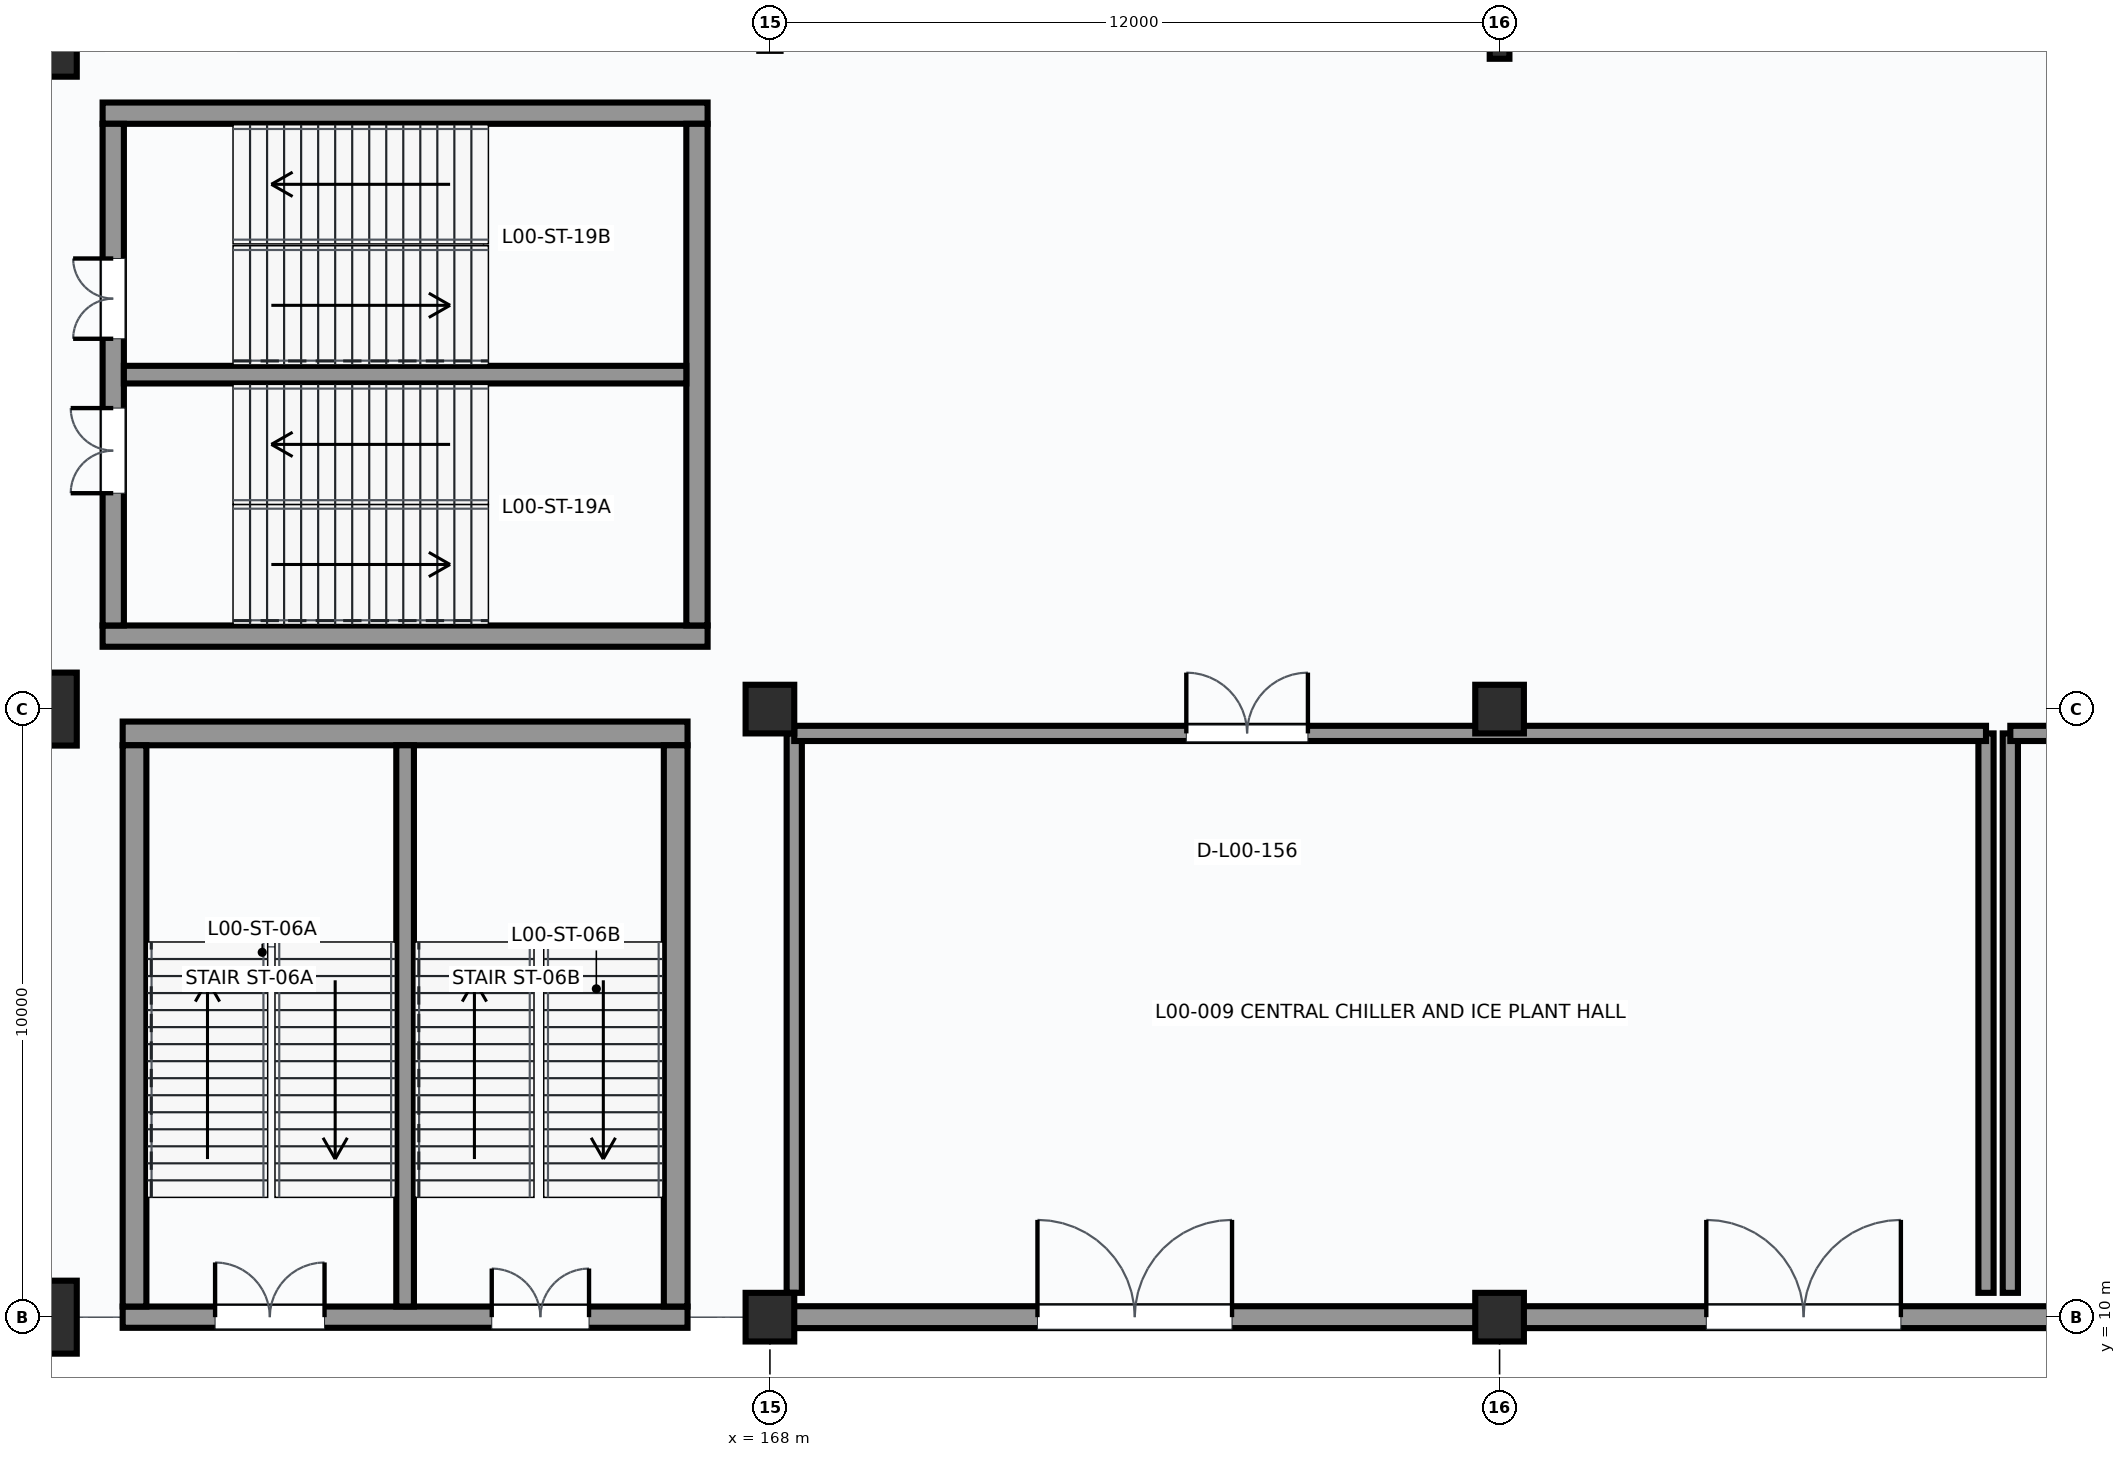
"""IFC4 building model, lengths in metres.
Left out: names, types, materials, properties, quantities, classifications, styles, units other than length and angle.
Written with IfcOpenShell. Run it as: python <this file> out.ifc"""

import sys

from ifc_helpers import new_model, si_unit, direction, frame, frame_2d, origin, origin_2d, place, context, subcontext, project, spatial, rectangle, i_section, extrude, element, fill, save


model = new_model("IFC4")
c1 = context("Model", 3, precision=1e-05, world=origin(), true_north=direction((0.0, 1.0)))
c2 = subcontext(c1, "Body", "Model", "MODEL_VIEW")
j1 = project(units=[si_unit("LENGTHUNIT", "METRE"), si_unit("PLANEANGLEUNIT", "RADIAN")], contexts=[c1])
p1 = place(None, origin())
s1 = spatial("IfcSite", under=j1, at=p1, CompositionType="ELEMENT")
p2 = place(p1, origin())
s2 = spatial("IfcBuilding", under=s1, at=p2, CompositionType="ELEMENT")
p3 = place(p2, origin())
s3 = spatial("IfcBuildingStorey", under=s2, at=p3, CompositionType="ELEMENT", Elevation=0.0)
for number, where, z_axis, x_axis in (
    (1, (156.0, 10.0, 0.0), (0.0, 0.0, 1.0), (1.0, 0.0, 0.0)),
    (2, (156.0, 20.0, 0.0), (0.0, 0.0, 1.0), (1.0, 0.0, 0.0)),
    (3, (156.0, 31.0, 0.0), (0.0, 0.0, 1.0), (1.0, 0.0, 0.0)),
):
    element("IfcColumn", number, at=place(p3, frame(where, z_axis=z_axis, x_axis=x_axis)), inside=s3, PredefinedType="COLUMN", context=c2, shape_type="SweptSolid", body=[
        extrude(rectangle(XDim=1.2, YDim=1.2, at=origin_2d()), origin(), (0.0, 0.0, 1.0), 5.4),
    ])
for number, where, z_axis, x_axis in (
    (4, (168.0, 10.0, 0.0), (0.0, 0.0, 1.0), (1.0, 0.0, 0.0)),
    (5, (168.0, 20.0, 0.0), (0.0, 0.0, 1.0), (1.0, 0.0, 0.0)),
    (6, (180.0, 10.0, 0.0), (0.0, 0.0, 1.0), (1.0, 0.0, 0.0)),
    (7, (180.0, 20.0, 0.0), (0.0, 0.0, 1.0), (1.0, 0.0, 0.0)),
):
    element("IfcColumn", number, at=place(p3, frame(where, z_axis=z_axis, x_axis=x_axis)), inside=s3, PredefinedType="COLUMN", context=c2, shape_type="SweptSolid", body=[
        extrude(rectangle(XDim=0.8, YDim=0.8, at=origin_2d()), origin(), (0.0, 0.0, 1.0), 5.4),
    ])
p4 = place(p3, frame((180.0, 31.0, 0.0), z_axis=(0.0, 0.0, 1.0), x_axis=(1.0, 0.0, 0.0)))
e8 = element("IfcColumn", 8, at=p4, inside=s3, PredefinedType="COLUMN", context=c2, shape_type="SweptSolid", body=[
    extrude(i_section(OverallWidth=0.324, OverallDepth=0.611, WebThickness=0.013, FlangeThickness=0.019, FilletRadius=0.016, at=origin_2d()), origin(), (0.0, 0.0, 1.0), 5.4),
])
p5 = place(p3, frame((168.385, 10.0, 0.0), z_axis=(0.0, 0.0, 1.0), x_axis=(1.0, 0.0, 0.0)))
e9 = element("IfcWall", 9, at=p5, inside=s3, PredefinedType="SOLIDWALL", context=c2, shape_type="SweptSolid", body=[
    extrude(rectangle(XDim=11.23, YDim=0.36, at=frame_2d((5.615, 0.0))), origin(), (0.0, 0.0, 1.0), 5.06),
])
p6 = place(p5, frame((4.015, 0.0, 0.0)))
e10 = element("IfcOpeningElement", 10, at=p6, cuts=e9, PredefinedType="OPENING", context=c2, shape_type="SweptSolid", body=[
    extrude(rectangle(XDim=3.2, YDim=2.4, at=frame_2d((1.6, 1.2))), frame((0.0, 0.19, 0.0), z_axis=(0.0, -1.0, 0.0), x_axis=(1.0, 0.0, 0.0)), (0.0, 0.0, 1.0), 0.38),
])
p7 = place(p3, frame((180.385, 10.0, 0.0), z_axis=(0.0, 0.0, 1.0), x_axis=(1.0, 0.0, 0.0)))
e11 = element("IfcWall", 11, at=p7, inside=s3, PredefinedType="SOLIDWALL", context=c2, shape_type="SweptSolid", body=[
    extrude(rectangle(XDim=9.23, YDim=0.36, at=frame_2d((4.615, 0.0))), origin(), (0.0, 0.0, 1.0), 5.06),
])
p8 = place(p7, frame((3.015, 0.0, 0.0)))
e12 = element("IfcOpeningElement", 12, at=p8, cuts=e11, PredefinedType="OPENING", context=c2, shape_type="SweptSolid", body=[
    extrude(rectangle(XDim=3.2, YDim=2.6, at=frame_2d((1.6, 1.3))), frame((0.0, 0.19, 0.0), z_axis=(0.0, -1.0, 0.0), x_axis=(1.0, 0.0, 0.0)), (0.0, 0.0, 1.0), 0.38),
])
p9 = place(p3, frame((157.355, 10.0, 0.0), z_axis=(0.0, 0.0, 1.0), x_axis=(1.0, 0.0, 0.0)))
e13 = element("IfcWall", 13, at=p9, inside=s3, PredefinedType="SHEAR", context=c2, shape_type="SweptSolid", body=[
    extrude(rectangle(XDim=9.29, YDim=0.35, at=frame_2d((4.645, 0.0))), origin(), (0.0, 0.0, 1.0), 4.574),
])
p10 = place(p9, frame((1.52, 0.0, 0.0)))
e14 = element("IfcOpeningElement", 14, at=p10, cuts=e13, PredefinedType="OPENING", context=c2, shape_type="SweptSolid", body=[
    extrude(rectangle(XDim=1.8, YDim=2.2, at=frame_2d((0.9, 1.1))), frame((0.0, 0.185, 0.0), z_axis=(0.0, -1.0, 0.0), x_axis=(1.0, 0.0, 0.0)), (0.0, 0.0, 1.0), 0.37),
])
p11 = place(p9, frame((6.07, 0.0, 0.0)))
e15 = element("IfcOpeningElement", 15, at=p11, cuts=e13, PredefinedType="OPENING", context=c2, shape_type="SweptSolid", body=[
    extrude(rectangle(XDim=1.6, YDim=2.2, at=frame_2d((0.8, 1.1))), frame((0.0, 0.185, 0.0), z_axis=(0.0, -1.0, 0.0), x_axis=(1.0, 0.0, 0.0)), (0.0, 0.0, 1.0), 0.37),
])
p12 = place(p3, frame((157.355, 19.6, 0.0), z_axis=(0.0, 0.0, 1.0), x_axis=(1.0, 0.0, 0.0)))
e16 = element("IfcWall", 16, at=p12, inside=s3, PredefinedType="SHEAR", context=c2, shape_type="SweptSolid", body=[
    extrude(rectangle(XDim=9.29, YDim=0.39, at=frame_2d((4.645, 0.0))), origin(), (0.0, 0.0, 1.0), 5.4),
])
for number, where, z_axis, x_axis in (
    (17, (157.55, 10.175, 0.0), (0.0, 0.0, 1.0), (0.0, 1.0, 0.0)),
    (18, (166.45, 10.175, 0.0), (0.0, 0.0, 1.0), (0.0, 1.0, 0.0)),
):
    element("IfcWall", number, at=place(p3, frame(where, z_axis=z_axis, x_axis=x_axis)), inside=s3, PredefinedType="SHEAR", context=c2, shape_type="SweptSolid", body=[
        extrude(rectangle(XDim=9.23, YDim=0.39, at=frame_2d((4.615, 0.0))), origin(), (0.0, 0.0, 1.0), 5.4),
    ])
p13 = place(p3, frame((162.0, 10.175, 0.0), z_axis=(0.0, 0.0, 1.0), x_axis=(0.0, 1.0, 0.0)))
e19 = element("IfcWall", 19, at=p13, inside=s3, PredefinedType="SHEAR", context=c2, shape_type="SweptSolid", body=[
    extrude(rectangle(XDim=9.23, YDim=0.29, at=frame_2d((4.615, 0.0))), origin(), (0.0, 0.0, 1.0), 5.4),
])
for number, where, z_axis, x_axis in (
    (20, (157.025, 21.2, 0.0), (0.0, 0.0, 1.0), (1.0, 0.0, 0.0)),
    (21, (157.025, 29.8, 0.0), (0.0, 0.0, 1.0), (1.0, 0.0, 0.0)),
):
    element("IfcWall", number, at=place(p3, frame(where, z_axis=z_axis, x_axis=x_axis)), inside=s3, PredefinedType="SHEAR", context=c2, shape_type="SweptSolid", body=[
        extrude(rectangle(XDim=9.95, YDim=0.35, at=frame_2d((4.975, 0.0))), origin(), (0.0, 0.0, 1.0), 5.4),
    ])
p14 = place(p3, frame((157.2, 21.375, 0.0), z_axis=(0.0, 0.0, 1.0), x_axis=(0.0, 1.0, 0.0)))
e22 = element("IfcWall", 22, at=p14, inside=s3, PredefinedType="SHEAR", context=c2, shape_type="SweptSolid", body=[
    extrude(rectangle(XDim=8.25, YDim=0.35, at=frame_2d((4.125, 0.0))), origin(), (0.0, 0.0, 1.0), 5.4),
])
p15 = place(p14, frame((2.175, 0.0, 0.0)))
e23 = element("IfcOpeningElement", 23, at=p15, cuts=e22, PredefinedType="OPENING", context=c2, shape_type="SweptSolid", body=[
    extrude(rectangle(XDim=1.4, YDim=2.2, at=frame_2d((0.7, 1.1))), frame((0.0, 0.185, 0.0), z_axis=(0.0, -1.0, 0.0), x_axis=(1.0, 0.0, 0.0)), (0.0, 0.0, 1.0), 0.37),
])
p16 = place(p14, frame((4.715, 0.0, 0.0)))
e24 = element("IfcOpeningElement", 24, at=p16, cuts=e22, PredefinedType="OPENING", context=c2, shape_type="SweptSolid", body=[
    extrude(rectangle(XDim=1.32, YDim=2.2, at=frame_2d((0.66, 1.1))), frame((0.0, 0.185, 0.0), z_axis=(0.0, -1.0, 0.0), x_axis=(1.0, 0.0, 0.0)), (0.0, 0.0, 1.0), 0.37),
])
p17 = place(p3, frame((166.8, 21.375, 0.0), z_axis=(0.0, 0.0, 1.0), x_axis=(0.0, 1.0, 0.0)))
e25 = element("IfcWall", 25, at=p17, inside=s3, PredefinedType="SHEAR", context=c2, shape_type="SweptSolid", body=[
    extrude(rectangle(XDim=8.25, YDim=0.35, at=frame_2d((4.125, 0.0))), origin(), (0.0, 0.0, 1.0), 5.4),
])
p18 = place(p3, frame((157.375, 25.5, 0.0), z_axis=(0.0, 0.0, 1.0), x_axis=(1.0, 0.0, 0.0)))
e26 = element("IfcWall", 26, at=p18, inside=s3, PredefinedType="SHEAR", context=c2, shape_type="SweptSolid", body=[
    extrude(rectangle(XDim=9.25, YDim=0.29, at=frame_2d((4.625, 0.0))), origin(), (0.0, 0.0, 1.0), 5.4),
])
p19 = place(p3, frame((188.0, 19.6, 0.0), z_axis=(0.0, 0.0, 1.0), x_axis=(0.0, -1.0, 0.0)))
e27 = element("IfcWall", 27, at=p19, inside=s3, PredefinedType="SOLIDWALL", context=c2, shape_type="SweptSolid", body=[
    extrude(rectangle(XDim=9.2, YDim=0.25, at=frame_2d((4.6, 0.0))), origin(), (0.0, 0.0, 1.0), 4.04),
])
p20 = place(p3, frame((168.4, 10.4, 0.0), z_axis=(0.0, 0.0, 1.0), x_axis=(0.0, 1.0, 0.0)))
e28 = element("IfcWall", 28, at=p20, inside=s3, PredefinedType="SOLIDWALL", context=c2, shape_type="SweptSolid", body=[
    extrude(rectangle(XDim=9.2, YDim=0.25, at=frame_2d((4.6, 0.0))), origin(), (0.0, 0.0, 1.0), 5.06),
])
p21 = place(p3, frame((168.4, 19.6, 0.0), z_axis=(0.0, 0.0, 1.0), x_axis=(1.0, 0.0, 0.0)))
e29 = element("IfcWall", 29, at=p21, inside=s3, PredefinedType="SOLIDWALL", context=c2, shape_type="SweptSolid", body=[
    extrude(rectangle(XDim=19.6, YDim=0.25, at=frame_2d((9.8, 0.0))), origin(), (0.0, 0.0, 1.0), 4.04),
])
p22 = place(p21, frame((6.448, 0.0, 0.0)))
e30 = element("IfcOpeningElement", 30, at=p22, cuts=e29, PredefinedType="OPENING", context=c2, shape_type="SweptSolid", body=[
    extrude(rectangle(XDim=2.0, YDim=2.4, at=frame_2d((1.0, 1.2))), frame((0.0, 0.135, 0.0), z_axis=(0.0, -1.0, 0.0), x_axis=(1.0, 0.0, 0.0)), (0.0, 0.0, 1.0), 0.27),
])
p23 = place(p3, frame((188.4, 10.4, 0.0), z_axis=(0.0, 0.0, 1.0), x_axis=(0.0, 1.0, 0.0)))
e31 = element("IfcWall", 31, at=p23, inside=s3, PredefinedType="SOLIDWALL", context=c2, shape_type="SweptSolid", body=[
    extrude(rectangle(XDim=9.2, YDim=0.25, at=frame_2d((4.6, 0.0))), origin(), (0.0, 0.0, 1.0), 4.04),
])
p24 = place(p3, frame((188.4, 19.6, 0.0), z_axis=(0.0, 0.0, 1.0), x_axis=(1.0, 0.0, 0.0)))
e32 = element("IfcWall", 32, at=p24, inside=s3, PredefinedType="SOLIDWALL", context=c2, shape_type="SweptSolid", body=[
    extrude(rectangle(XDim=11.6, YDim=0.25, at=frame_2d((5.8, 0.0))), origin(), (0.0, 0.0, 1.0), 4.04),
])
p25 = place(p24, frame((4.8, 0.0, 0.0)))
e33 = element("IfcOpeningElement", 33, at=p25, cuts=e32, PredefinedType="OPENING", context=c2, shape_type="SweptSolid", body=[
    extrude(rectangle(XDim=2.0, YDim=2.4, at=frame_2d((1.0, 1.2))), frame((0.0, 0.135, 0.0), z_axis=(0.0, -1.0, 0.0), x_axis=(1.0, 0.0, 0.0)), (0.0, 0.0, 1.0), 0.27),
])
p26 = place(p6, frame((3.2, 0.0, 0.0), z_axis=(0.0, 0.0, 1.0), x_axis=(-1.0, 0.0, 0.0)))
e34 = element("IfcDoor", 34, at=p26, inside=s3, OperationType="DOUBLE_DOOR_SINGLE_SWING", PredefinedType="DOOR", context=c2, shape_type="SweptSolid", body=[
    extrude(rectangle(XDim=3.2, YDim=2.4, at=frame_2d((1.6, 1.2))), frame((0.0, 0.025, 0.0), z_axis=(0.0, -1.0, 0.0), x_axis=(1.0, 0.0, 0.0)), (0.0, 0.0, 1.0), 0.05),
])
fill(e10, e34)
p27 = place(p8, frame((3.2, 0.0, 0.0), z_axis=(0.0, 0.0, 1.0), x_axis=(-1.0, 0.0, 0.0)))
e35 = element("IfcDoor", 35, at=p27, inside=s3, OperationType="DOUBLE_DOOR_SINGLE_SWING", PredefinedType="DOOR", context=c2, shape_type="SweptSolid", body=[
    extrude(rectangle(XDim=3.2, YDim=2.6, at=frame_2d((1.6, 1.3))), frame((0.0, 0.025, 0.0), z_axis=(0.0, -1.0, 0.0), x_axis=(1.0, 0.0, 0.0)), (0.0, 0.0, 1.0), 0.05),
])
fill(e12, e35)
p28 = place(p10, frame((1.8, 0.0, 0.0), z_axis=(0.0, 0.0, 1.0), x_axis=(-1.0, 0.0, 0.0)))
e36 = element("IfcDoor", 36, at=p28, inside=s3, OperationType="DOUBLE_DOOR_SINGLE_SWING", PredefinedType="DOOR", context=c2, shape_type="SweptSolid", body=[
    extrude(rectangle(XDim=1.8, YDim=2.2, at=frame_2d((0.9, 1.1))), frame((0.0, 0.025, 0.0), z_axis=(0.0, -1.0, 0.0), x_axis=(1.0, 0.0, 0.0)), (0.0, 0.0, 1.0), 0.05),
])
fill(e14, e36)
p29 = place(p11, frame((1.6, 0.0, 0.0), z_axis=(0.0, 0.0, 1.0), x_axis=(-1.0, 0.0, 0.0)))
e37 = element("IfcDoor", 37, at=p29, inside=s3, OperationType="DOUBLE_DOOR_SINGLE_SWING", PredefinedType="DOOR", context=c2, shape_type="SweptSolid", body=[
    extrude(rectangle(XDim=1.6, YDim=2.2, at=frame_2d((0.8, 1.1))), frame((0.0, 0.025, 0.0), z_axis=(0.0, -1.0, 0.0), x_axis=(1.0, 0.0, 0.0)), (0.0, 0.0, 1.0), 0.05),
])
fill(e15, e37)
p30 = place(p15, origin())
e38 = element("IfcDoor", 38, at=p30, inside=s3, OperationType="DOUBLE_DOOR_SINGLE_SWING", PredefinedType="DOOR", context=c2, shape_type="SweptSolid", body=[
    extrude(rectangle(XDim=1.4, YDim=2.2, at=frame_2d((0.7, 1.1))), frame((0.0, 0.025, 0.0), z_axis=(0.0, -1.0, 0.0), x_axis=(1.0, 0.0, 0.0)), (0.0, 0.0, 1.0), 0.05),
])
fill(e23, e38)
p31 = place(p16, origin())
e39 = element("IfcDoor", 39, at=p31, inside=s3, OperationType="DOUBLE_DOOR_SINGLE_SWING", PredefinedType="DOOR", context=c2, shape_type="SweptSolid", body=[
    extrude(rectangle(XDim=1.32, YDim=2.2, at=frame_2d((0.66, 1.1))), frame((0.0, 0.025, 0.0), z_axis=(0.0, -1.0, 0.0), x_axis=(1.0, 0.0, 0.0)), (0.0, 0.0, 1.0), 0.05),
])
fill(e24, e39)
p32 = place(p22, origin())
e40 = element("IfcDoor", 40, at=p32, inside=s3, OperationType="DOUBLE_DOOR_SINGLE_SWING", PredefinedType="DOOR", context=c2, shape_type="SweptSolid", body=[
    extrude(rectangle(XDim=2.0, YDim=2.4, at=frame_2d((1.0, 1.2))), frame((0.0, 0.025, 0.0), z_axis=(0.0, -1.0, 0.0), x_axis=(1.0, 0.0, 0.0)), (0.0, 0.0, 1.0), 0.05),
])
fill(e30, e40)
save(model, sys.argv[1])
